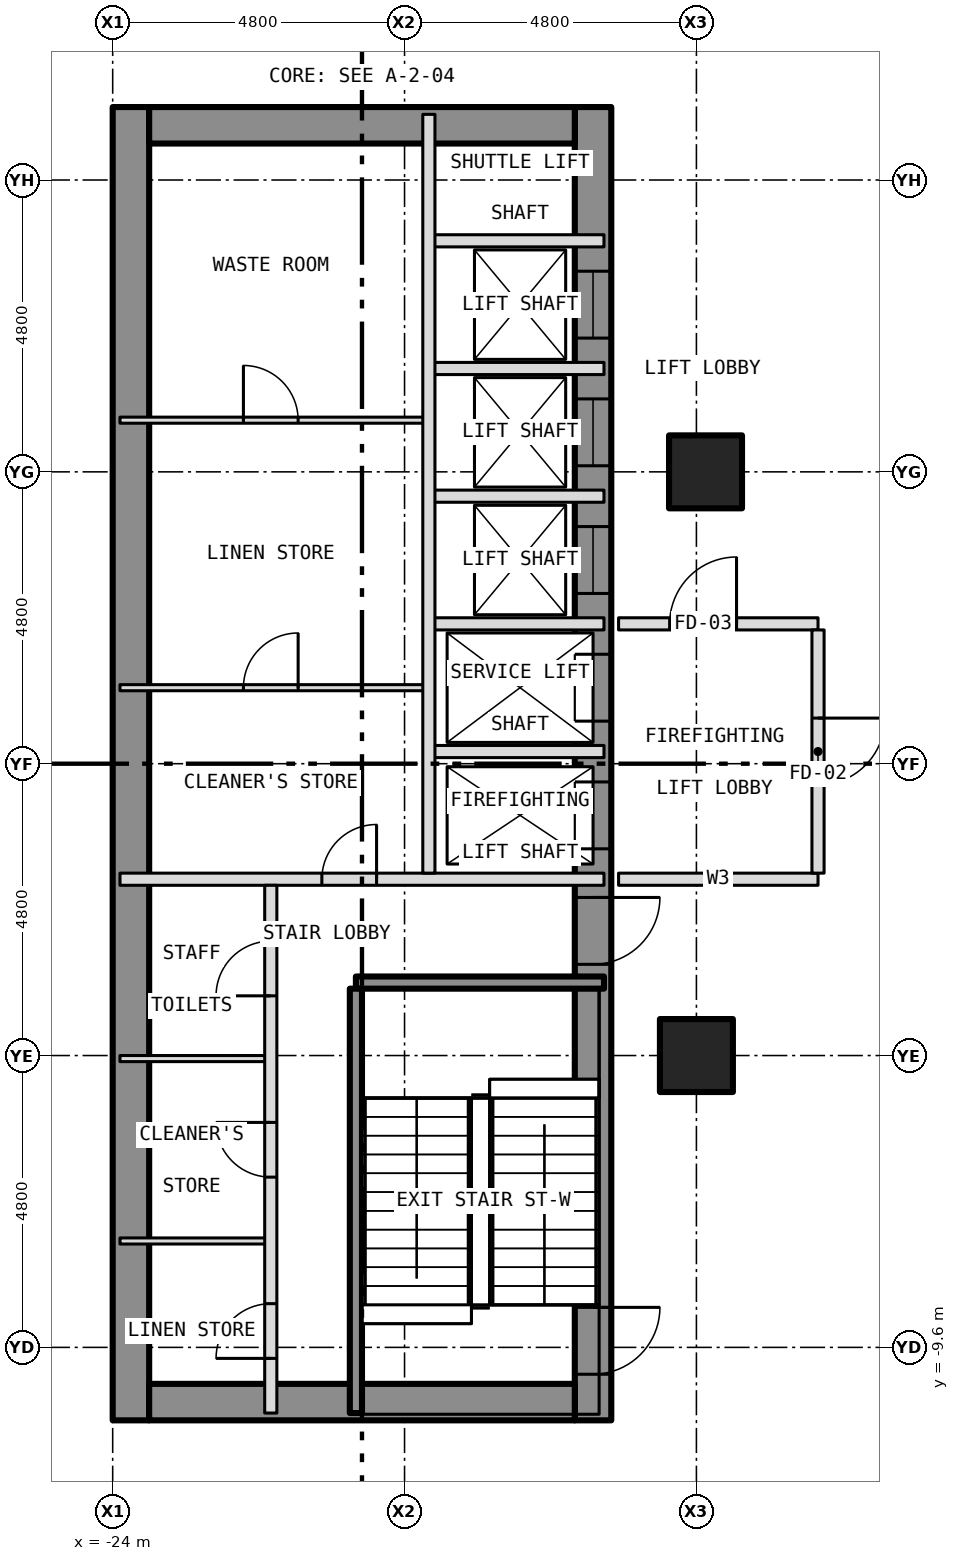
"""IFC4 building model, lengths in metres.
Left out: names, types, materials, properties, quantities, classifications, styles, units other than length and angle.
Written with IfcOpenShell. Run it as: python <this file> out.ifc"""

import sys

from ifc_helpers import new_model, si_unit, direction, frame, frame_2d, origin, origin_2d, place, context, subcontext, project, spatial, rectangle, hollow_rectangle, extrude, element, fill, save


model = new_model("IFC4")
c1 = context("Model", 3, precision=1e-05, world=origin(), true_north=direction((0.0, 1.0)))
c2 = subcontext(c1, "Body", "Model", "MODEL_VIEW")
j1 = project(units=[si_unit("LENGTHUNIT", "METRE"), si_unit("PLANEANGLEUNIT", "RADIAN")], contexts=[c1])
p1 = place(None, origin())
s1 = spatial("IfcSite", under=j1, at=p1, CompositionType="ELEMENT")
p2 = place(p1, origin())
s2 = spatial("IfcBuilding", under=s1, at=p2, CompositionType="ELEMENT")
p3 = place(p2, frame((0.0, 0.0, 7.5)))
s3 = spatial("IfcBuildingStorey", under=s2, at=p3, CompositionType="ELEMENT", Elevation=7.5)
for number, where, z_axis, x_axis in (
    (1, (-14.4, -4.8, -0.25), (0.0, 0.0, 1.0), (1.0, 0.0, 0.0)),
    (2, (-14.25, 4.8, -0.25), (0.0, 0.0, 1.0), (1.0, 0.0, 0.0)),
):
    element("IfcColumn", number, at=place(p3, frame(where, z_axis=z_axis, x_axis=x_axis)), inside=s3, PredefinedType="COLUMN", context=c2, shape_type="SweptSolid", body=[
        extrude(hollow_rectangle(XDim=1.2, YDim=1.2, WallThickness=0.07, at=origin_2d()), origin(), (0.0, 0.0, 1.0), 8.05),
    ])
p4 = place(p3, frame((-16.1, -10.8, 0.0), z_axis=(0.0, 0.0, 1.0), x_axis=(0.0, 1.0, 0.0)))
e3 = element("IfcWall", 3, at=p4, inside=s3, PredefinedType="SHEAR", context=c2, shape_type="SweptSolid", body=[
    extrude(rectangle(XDim=21.6, YDim=0.6, at=frame_2d((10.8, 0.0))), origin(), (0.0, 0.0, 1.0), 7.7),
])
p5 = place(p4, frame((9.4, 0.0, 0.0)))
e4 = element("IfcOpeningElement", 4, at=p5, cuts=e3, PredefinedType="OPENING", context=c2, shape_type="SweptSolid", body=[
    extrude(rectangle(XDim=1.1, YDim=2.1, at=frame_2d((0.55, 1.05))), frame((0.0, 0.312, 0.0), z_axis=(0.0, -1.0, 0.0), x_axis=(1.0, 0.0, 0.0)), (0.0, 0.0, 1.0), 0.624),
])
p6 = place(p4, frame((11.5, 0.0, 0.0)))
e5 = element("IfcOpeningElement", 5, at=p6, cuts=e3, PredefinedType="OPENING", context=c2, shape_type="SweptSolid", body=[
    extrude(rectangle(XDim=1.1, YDim=2.1, at=frame_2d((0.55, 1.05))), frame((0.0, 0.312, 0.0), z_axis=(0.0, -1.0, 0.0), x_axis=(1.0, 0.0, 0.0)), (0.0, 0.0, 1.0), 0.624),
])
p7 = place(p4, frame((13.6, 0.0, 0.0)))
e6 = element("IfcOpeningElement", 6, at=p7, cuts=e3, PredefinedType="OPENING", context=c2, shape_type="SweptSolid", body=[
    extrude(rectangle(XDim=1.1, YDim=2.1, at=frame_2d((0.55, 1.05))), frame((0.0, 0.312, 0.0), z_axis=(0.0, -1.0, 0.0), x_axis=(1.0, 0.0, 0.0)), (0.0, 0.0, 1.0), 0.624),
])
p8 = place(p4, frame((15.7, 0.0, 0.0)))
e7 = element("IfcOpeningElement", 7, at=p8, cuts=e3, PredefinedType="OPENING", context=c2, shape_type="SweptSolid", body=[
    extrude(rectangle(XDim=1.1, YDim=2.1, at=frame_2d((0.55, 1.05))), frame((0.0, 0.312, 0.0), z_axis=(0.0, -1.0, 0.0), x_axis=(1.0, 0.0, 0.0)), (0.0, 0.0, 1.0), 0.624),
])
p9 = place(p4, frame((17.8, 0.0, 0.0)))
e8 = element("IfcOpeningElement", 8, at=p9, cuts=e3, PredefinedType="OPENING", context=c2, shape_type="SweptSolid", body=[
    extrude(rectangle(XDim=1.1, YDim=2.1, at=frame_2d((0.55, 1.05))), frame((0.0, 0.312, 0.0), z_axis=(0.0, -1.0, 0.0), x_axis=(1.0, 0.0, 0.0)), (0.0, 0.0, 1.0), 0.624),
])
p10 = place(p4, frame((0.758, 0.0, 0.0)))
e9 = element("IfcOpeningElement", 9, at=p10, cuts=e3, PredefinedType="OPENING", context=c2, shape_type="SweptSolid", body=[
    extrude(rectangle(XDim=1.1, YDim=2.1, at=frame_2d((0.55, 1.05))), frame((0.0, 0.312, 0.0), z_axis=(0.0, -1.0, 0.0), x_axis=(1.0, 0.0, 0.0)), (0.0, 0.0, 1.0), 0.624),
])
p11 = place(p4, frame((7.5, 0.0, 0.0)))
e10 = element("IfcOpeningElement", 10, at=p11, cuts=e3, PredefinedType="OPENING", context=c2, shape_type="SweptSolid", body=[
    extrude(rectangle(XDim=1.1, YDim=2.1, at=frame_2d((0.55, 1.05))), frame((0.0, 0.312, 0.0), z_axis=(0.0, -1.0, 0.0), x_axis=(1.0, 0.0, 0.0)), (0.0, 0.0, 1.0), 0.624),
])
p12 = place(p3, frame((-23.7, -10.8, 0.0), z_axis=(0.0, 0.0, 1.0), x_axis=(0.0, 1.0, 0.0)))
e11 = element("IfcWall", 11, at=p12, inside=s3, PredefinedType="SHEAR", context=c2, shape_type="SweptSolid", body=[
    extrude(rectangle(XDim=21.6, YDim=0.6, at=frame_2d((10.8, 0.0))), origin(), (0.0, 0.0, 1.0), 7.7),
])
for number, where, z_axis, x_axis in (
    (12, (-23.4, 10.5, 0.0), (0.0, 0.0, 1.0), (1.0, 0.0, 0.0)),
    (13, (-23.4, -10.5, 0.0), (0.0, 0.0, 1.0), (1.0, 0.0, 0.0)),
):
    element("IfcWall", number, at=place(p3, frame(where, z_axis=z_axis, x_axis=x_axis)), inside=s3, PredefinedType="SHEAR", context=c2, shape_type="SweptSolid", body=[
        extrude(rectangle(XDim=7.0, YDim=0.6, at=frame_2d((3.5, 0.0))), origin(), (0.0, 0.0, 1.0), 7.7),
    ])
for number, where, z_axis, x_axis in (
    (14, (-23.88, -7.85, 0.0), (0.0, 0.0, 1.0), (1.0, 0.0, 0.0)),
    (15, (-23.88, -4.85, 0.0), (0.0, 0.0, 1.0), (1.0, 0.0, 0.0)),
):
    element("IfcWall", number, at=place(p3, frame(where, z_axis=z_axis, x_axis=x_axis)), inside=s3, PredefinedType="PARTITIONING", context=c2, shape_type="SweptSolid", body=[
        extrude(rectangle(XDim=2.48, YDim=0.1, at=frame_2d((1.24, 0.0))), origin(), (0.0, 0.0, 1.0), 7.7),
    ])
p13 = place(p3, frame((-20.0, -3.6, 0.0), z_axis=(0.0, 0.0, 1.0), x_axis=(1.0, 0.0, 0.0)))
e16 = element("IfcWall", 16, at=p13, inside=s3, PredefinedType="SHEAR", context=c2, shape_type="SweptSolid", body=[
    extrude(rectangle(XDim=4.08, YDim=0.2, at=frame_2d((2.04, 0.0))), origin(), (0.0, 0.0, 1.0), 7.7),
])
p14 = place(p3, frame((-23.88, -1.9, 0.0), z_axis=(0.0, 0.0, 1.0), x_axis=(1.0, 0.0, 0.0)))
e17 = element("IfcWall", 17, at=p14, inside=s3, PredefinedType="PARTITIONING", context=c2, shape_type="SweptSolid", body=[
    extrude(rectangle(XDim=7.96, YDim=0.2, at=frame_2d((3.98, 0.0))), origin(), (0.0, 0.0, 1.0), 7.7),
])
p15 = place(p14, frame((3.32, 0.0, 0.0)))
e18 = element("IfcOpeningElement", 18, at=p15, cuts=e17, PredefinedType="OPENING", context=c2, shape_type="SweptSolid", body=[
    extrude(rectangle(XDim=0.9, YDim=2.1, at=frame_2d((0.45, 1.05))), frame((0.0, 0.112, 0.0), z_axis=(0.0, -1.0, 0.0), x_axis=(1.0, 0.0, 0.0)), (0.0, 0.0, 1.0), 0.224),
])
p16 = place(p3, frame((-15.68, -1.9, 0.0), z_axis=(0.0, 0.0, 1.0), x_axis=(1.0, 0.0, 0.0)))
e19 = element("IfcWall", 19, at=p16, inside=s3, PredefinedType="PARTITIONING", context=c2, shape_type="SweptSolid", body=[
    extrude(rectangle(XDim=3.28, YDim=0.2, at=frame_2d((1.64, 0.0))), origin(), (0.0, 0.0, 1.0), 7.8),
])
p17 = place(p3, frame((-18.8, 0.2, 0.0), z_axis=(0.0, 0.0, 1.0), x_axis=(1.0, 0.0, 0.0)))
e20 = element("IfcWall", 20, at=p17, inside=s3, PredefinedType="PARTITIONING", context=c2, shape_type="SweptSolid", body=[
    extrude(rectangle(XDim=2.88, YDim=0.2, at=frame_2d((1.44, 0.0))), origin(), (0.0, 0.0, 1.0), 7.7),
])
p18 = place(p3, frame((-23.88, 1.25, 0.0), z_axis=(0.0, 0.0, 1.0), x_axis=(1.0, 0.0, 0.0)))
e21 = element("IfcWall", 21, at=p18, inside=s3, PredefinedType="PARTITIONING", context=c2, shape_type="SweptSolid", body=[
    extrude(rectangle(XDim=5.08, YDim=0.1, at=frame_2d((2.54, 0.0))), origin(), (0.0, 0.0, 1.0), 7.7),
])
p19 = place(p18, frame((2.03, 0.0, 0.0)))
e22 = element("IfcOpeningElement", 22, at=p19, cuts=e21, PredefinedType="OPENING", context=c2, shape_type="SweptSolid", body=[
    extrude(rectangle(XDim=0.9, YDim=2.1, at=frame_2d((0.45, 1.05))), frame((0.0, 0.062, 0.0), z_axis=(0.0, -1.0, 0.0), x_axis=(1.0, 0.0, 0.0)), (0.0, 0.0, 1.0), 0.124),
])
p20 = place(p3, frame((-18.8, 2.3, 0.0), z_axis=(0.0, 0.0, 1.0), x_axis=(1.0, 0.0, 0.0)))
e23 = element("IfcWall", 23, at=p20, inside=s3, PredefinedType="PARTITIONING", context=c2, shape_type="SweptSolid", body=[
    extrude(rectangle(XDim=2.88, YDim=0.2, at=frame_2d((1.44, 0.0))), origin(), (0.0, 0.0, 1.0), 7.7),
])
p21 = place(p3, frame((-15.68, 2.3, 0.0), z_axis=(0.0, 0.0, 1.0), x_axis=(1.0, 0.0, 0.0)))
e24 = element("IfcWall", 24, at=p21, inside=s3, PredefinedType="PARTITIONING", context=c2, shape_type="SweptSolid", body=[
    extrude(rectangle(XDim=3.28, YDim=0.2, at=frame_2d((1.64, 0.0))), origin(), (0.0, 0.0, 1.0), 7.8),
])
p22 = place(p21, frame((0.84, 0.0, 0.0)))
e25 = element("IfcOpeningElement", 25, at=p22, cuts=e24, PredefinedType="OPENING", context=c2, shape_type="SweptSolid", body=[
    extrude(rectangle(XDim=1.1, YDim=2.1, at=frame_2d((0.55, 1.05))), frame((0.0, 0.112, 0.0), z_axis=(0.0, -1.0, 0.0), x_axis=(1.0, 0.0, 0.0)), (0.0, 0.0, 1.0), 0.224),
])
p23 = place(p3, frame((-18.8, 4.4, 0.0), z_axis=(0.0, 0.0, 1.0), x_axis=(1.0, 0.0, 0.0)))
e26 = element("IfcWall", 26, at=p23, inside=s3, PredefinedType="PARTITIONING", context=c2, shape_type="SweptSolid", body=[
    extrude(rectangle(XDim=2.88, YDim=0.2, at=frame_2d((1.44, 0.0))), origin(), (0.0, 0.0, 1.0), 7.7),
])
p24 = place(p3, frame((-23.88, 5.65, 0.0), z_axis=(0.0, 0.0, 1.0), x_axis=(1.0, 0.0, 0.0)))
e27 = element("IfcWall", 27, at=p24, inside=s3, PredefinedType="PARTITIONING", context=c2, shape_type="SweptSolid", body=[
    extrude(rectangle(XDim=5.08, YDim=0.1, at=frame_2d((2.54, 0.0))), origin(), (0.0, 0.0, 1.0), 7.7),
])
p25 = place(p24, frame((2.03, 0.0, 0.0)))
e28 = element("IfcOpeningElement", 28, at=p25, cuts=e27, PredefinedType="OPENING", context=c2, shape_type="SweptSolid", body=[
    extrude(rectangle(XDim=0.9, YDim=2.1, at=frame_2d((0.45, 1.05))), frame((0.0, 0.062, 0.0), z_axis=(0.0, -1.0, 0.0), x_axis=(1.0, 0.0, 0.0)), (0.0, 0.0, 1.0), 0.124),
])
for number, where, z_axis, x_axis in (
    (29, (-18.8, 6.5, 0.0), (0.0, 0.0, 1.0), (1.0, 0.0, 0.0)),
    (30, (-18.8, 8.6, 0.0), (0.0, 0.0, 1.0), (1.0, 0.0, 0.0)),
):
    element("IfcWall", number, at=place(p3, frame(where, z_axis=z_axis, x_axis=x_axis)), inside=s3, PredefinedType="PARTITIONING", context=c2, shape_type="SweptSolid", body=[
        extrude(rectangle(XDim=2.88, YDim=0.2, at=frame_2d((1.44, 0.0))), origin(), (0.0, 0.0, 1.0), 7.7),
    ])
p26 = place(p3, frame((-21.4, -10.68, 0.0), z_axis=(0.0, 0.0, 1.0), x_axis=(0.0, 1.0, 0.0)))
e31 = element("IfcWall", 31, at=p26, inside=s3, PredefinedType="PARTITIONING", context=c2, shape_type="SweptSolid", body=[
    extrude(rectangle(XDim=8.68, YDim=0.2, at=frame_2d((4.34, 0.0))), origin(), (0.0, 0.0, 1.0), 7.7),
])
p27 = place(p26, frame((0.899, 0.0, 0.0)))
e32 = element("IfcOpeningElement", 32, at=p27, cuts=e31, PredefinedType="OPENING", context=c2, shape_type="SweptSolid", body=[
    extrude(rectangle(XDim=0.9, YDim=2.1, at=frame_2d((0.45, 1.05))), frame((0.0, 0.112, 0.0), z_axis=(0.0, -1.0, 0.0), x_axis=(1.0, 0.0, 0.0)), (0.0, 0.0, 1.0), 0.224),
])
p28 = place(p26, frame((3.88, 0.0, 0.0)))
e33 = element("IfcOpeningElement", 33, at=p28, cuts=e31, PredefinedType="OPENING", context=c2, shape_type="SweptSolid", body=[
    extrude(rectangle(XDim=0.9, YDim=2.1, at=frame_2d((0.45, 1.05))), frame((0.0, 0.112, 0.0), z_axis=(0.0, -1.0, 0.0), x_axis=(1.0, 0.0, 0.0)), (0.0, 0.0, 1.0), 0.224),
])
p29 = place(p26, frame((6.862, 0.0, 0.0)))
e34 = element("IfcOpeningElement", 34, at=p29, cuts=e31, PredefinedType="OPENING", context=c2, shape_type="SweptSolid", body=[
    extrude(rectangle(XDim=0.9, YDim=2.1, at=frame_2d((0.45, 1.05))), frame((0.0, 0.112, 0.0), z_axis=(0.0, -1.0, 0.0), x_axis=(1.0, 0.0, 0.0)), (0.0, 0.0, 1.0), 0.224),
])
p30 = place(p3, frame((-20.0, -10.68, 0.0), z_axis=(0.0, 0.0, 1.0), x_axis=(0.0, 1.0, 0.0)))
e35 = element("IfcWall", 35, at=p30, inside=s3, PredefinedType="SHEAR", context=c2, shape_type="SweptSolid", body=[
    extrude(rectangle(XDim=6.98, YDim=0.2, at=frame_2d((3.49, 0.0))), origin(), (0.0, 0.0, 1.0), 7.7),
])
p31 = place(p3, frame((-18.8, -1.8, 0.0), z_axis=(0.0, 0.0, 1.0), x_axis=(0.0, 1.0, 0.0)))
e36 = element("IfcWall", 36, at=p31, inside=s3, PredefinedType="PARTITIONING", context=c2, shape_type="SweptSolid", body=[
    extrude(rectangle(XDim=12.48, YDim=0.2, at=frame_2d((6.24, 0.0))), origin(), (0.0, 0.0, 1.0), 7.7),
])
p32 = place(p3, frame((-12.4, -1.8, 0.0), z_axis=(0.0, 0.0, 1.0), x_axis=(0.0, 1.0, 0.0)))
e37 = element("IfcWall", 37, at=p32, inside=s3, PredefinedType="PARTITIONING", context=c2, shape_type="SweptSolid", body=[
    extrude(rectangle(XDim=4.0, YDim=0.2, at=frame_2d((2.0, 0.0))), origin(), (0.0, 0.0, 1.0), 7.8),
])
p33 = place(p32, frame((1.45, 0.0, 0.0)))
e38 = element("IfcOpeningElement", 38, at=p33, cuts=e37, PredefinedType="OPENING", context=c2, shape_type="SweptSolid", body=[
    extrude(rectangle(XDim=1.1, YDim=2.1, at=frame_2d((0.55, 1.05))), frame((0.0, 0.112, 0.0), z_axis=(0.0, -1.0, 0.0), x_axis=(1.0, 0.0, 0.0)), (0.0, 0.0, 1.0), 0.224),
])
p34 = place(p5, origin())
e39 = element("IfcDoor", 39, at=p34, inside=s3, OperationType="SLIDING_TO_LEFT", PredefinedType="DOOR", context=c2, shape_type="SweptSolid", body=[
    extrude(rectangle(XDim=1.1, YDim=2.1, at=frame_2d((0.55, 1.05))), frame((0.0, 0.025, 0.0), z_axis=(0.0, -1.0, 0.0), x_axis=(1.0, 0.0, 0.0)), (0.0, 0.0, 1.0), 0.05),
])
fill(e4, e39)
p35 = place(p6, origin())
e40 = element("IfcDoor", 40, at=p35, inside=s3, OperationType="SLIDING_TO_LEFT", PredefinedType="DOOR", context=c2, shape_type="SweptSolid", body=[
    extrude(rectangle(XDim=1.1, YDim=2.1, at=frame_2d((0.55, 1.05))), frame((0.0, 0.025, 0.0), z_axis=(0.0, -1.0, 0.0), x_axis=(1.0, 0.0, 0.0)), (0.0, 0.0, 1.0), 0.05),
])
fill(e5, e40)
p36 = place(p7, origin())
e41 = element("IfcDoor", 41, at=p36, inside=s3, OperationType="SLIDING_TO_LEFT", PredefinedType="DOOR", context=c2, shape_type="SweptSolid", body=[
    extrude(rectangle(XDim=1.1, YDim=2.1, at=frame_2d((0.55, 1.05))), frame((0.0, 0.025, 0.0), z_axis=(0.0, -1.0, 0.0), x_axis=(1.0, 0.0, 0.0)), (0.0, 0.0, 1.0), 0.05),
])
fill(e6, e41)
p37 = place(p8, origin())
e42 = element("IfcDoor", 42, at=p37, inside=s3, OperationType="SLIDING_TO_LEFT", PredefinedType="DOOR", context=c2, shape_type="SweptSolid", body=[
    extrude(rectangle(XDim=1.1, YDim=2.1, at=frame_2d((0.55, 1.05))), frame((0.0, 0.025, 0.0), z_axis=(0.0, -1.0, 0.0), x_axis=(1.0, 0.0, 0.0)), (0.0, 0.0, 1.0), 0.05),
])
fill(e7, e42)
p38 = place(p9, origin())
e43 = element("IfcDoor", 43, at=p38, inside=s3, OperationType="SLIDING_TO_LEFT", PredefinedType="DOOR", context=c2, shape_type="SweptSolid", body=[
    extrude(rectangle(XDim=1.1, YDim=2.1, at=frame_2d((0.55, 1.05))), frame((0.0, 0.025, 0.0), z_axis=(0.0, -1.0, 0.0), x_axis=(1.0, 0.0, 0.0)), (0.0, 0.0, 1.0), 0.05),
])
fill(e8, e43)
p39 = place(p10, origin())
e44 = element("IfcDoor", 44, at=p39, inside=s3, OperationType="SINGLE_SWING_RIGHT", PredefinedType="DOOR", context=c2, shape_type="SweptSolid", body=[
    extrude(rectangle(XDim=1.1, YDim=2.1, at=frame_2d((0.55, 1.05))), frame((0.0, 0.025, 0.0), z_axis=(0.0, -1.0, 0.0), x_axis=(1.0, 0.0, 0.0)), (0.0, 0.0, 1.0), 0.05),
])
fill(e9, e44)
p40 = place(p11, origin())
e45 = element("IfcDoor", 45, at=p40, inside=s3, OperationType="SINGLE_SWING_RIGHT", PredefinedType="DOOR", context=c2, shape_type="SweptSolid", body=[
    extrude(rectangle(XDim=1.1, YDim=2.1, at=frame_2d((0.55, 1.05))), frame((0.0, 0.025, 0.0), z_axis=(0.0, -1.0, 0.0), x_axis=(1.0, 0.0, 0.0)), (0.0, 0.0, 1.0), 0.05),
])
fill(e10, e45)
p41 = place(p27, origin())
e46 = element("IfcDoor", 46, at=p41, inside=s3, OperationType="SINGLE_SWING_LEFT", PredefinedType="DOOR", context=c2, shape_type="SweptSolid", body=[
    extrude(rectangle(XDim=0.9, YDim=2.1, at=frame_2d((0.45, 1.05))), frame((0.0, 0.025, 0.0), z_axis=(0.0, -1.0, 0.0), x_axis=(1.0, 0.0, 0.0)), (0.0, 0.0, 1.0), 0.05),
])
fill(e32, e46)
p42 = place(p28, origin())
e47 = element("IfcDoor", 47, at=p42, inside=s3, OperationType="SINGLE_SWING_RIGHT", PredefinedType="DOOR", context=c2, shape_type="SweptSolid", body=[
    extrude(rectangle(XDim=0.9, YDim=2.1, at=frame_2d((0.45, 1.05))), frame((0.0, 0.025, 0.0), z_axis=(0.0, -1.0, 0.0), x_axis=(1.0, 0.0, 0.0)), (0.0, 0.0, 1.0), 0.05),
])
fill(e33, e47)
p43 = place(p29, origin())
e48 = element("IfcDoor", 48, at=p43, inside=s3, OperationType="SINGLE_SWING_LEFT", PredefinedType="DOOR", context=c2, shape_type="SweptSolid", body=[
    extrude(rectangle(XDim=0.9, YDim=2.1, at=frame_2d((0.45, 1.05))), frame((0.0, 0.025, 0.0), z_axis=(0.0, -1.0, 0.0), x_axis=(1.0, 0.0, 0.0)), (0.0, 0.0, 1.0), 0.05),
])
fill(e34, e48)
p44 = place(p15, origin())
e49 = element("IfcDoor", 49, at=p44, inside=s3, OperationType="SINGLE_SWING_RIGHT", PredefinedType="DOOR", context=c2, shape_type="SweptSolid", body=[
    extrude(rectangle(XDim=0.9, YDim=2.1, at=frame_2d((0.45, 1.05))), frame((0.0, 0.025, 0.0), z_axis=(0.0, -1.0, 0.0), x_axis=(1.0, 0.0, 0.0)), (0.0, 0.0, 1.0), 0.05),
])
fill(e18, e49)
p45 = place(p19, origin())
e50 = element("IfcDoor", 50, at=p45, inside=s3, OperationType="SINGLE_SWING_RIGHT", PredefinedType="DOOR", context=c2, shape_type="SweptSolid", body=[
    extrude(rectangle(XDim=0.9, YDim=2.1, at=frame_2d((0.45, 1.05))), frame((0.0, 0.025, 0.0), z_axis=(0.0, -1.0, 0.0), x_axis=(1.0, 0.0, 0.0)), (0.0, 0.0, 1.0), 0.05),
])
fill(e22, e50)
p46 = place(p25, origin())
e51 = element("IfcDoor", 51, at=p46, inside=s3, OperationType="SINGLE_SWING_LEFT", PredefinedType="DOOR", context=c2, shape_type="SweptSolid", body=[
    extrude(rectangle(XDim=0.9, YDim=2.1, at=frame_2d((0.45, 1.05))), frame((0.0, 0.025, 0.0), z_axis=(0.0, -1.0, 0.0), x_axis=(1.0, 0.0, 0.0)), (0.0, 0.0, 1.0), 0.05),
])
fill(e28, e51)
p47 = place(p33, origin())
e52 = element("IfcDoor", 52, at=p47, inside=s3, OperationType="SINGLE_SWING_RIGHT", PredefinedType="DOOR", context=c2, shape_type="SweptSolid", body=[
    extrude(rectangle(XDim=1.1, YDim=2.1, at=frame_2d((0.55, 1.05))), frame((0.0, 0.025, 0.0), z_axis=(0.0, -1.0, 0.0), x_axis=(1.0, 0.0, 0.0)), (0.0, 0.0, 1.0), 0.05),
])
fill(e38, e52)
p48 = place(p22, origin())
e53 = element("IfcDoor", 53, at=p48, inside=s3, OperationType="SINGLE_SWING_RIGHT", PredefinedType="DOOR", context=c2, shape_type="SweptSolid", body=[
    extrude(rectangle(XDim=1.1, YDim=2.1, at=frame_2d((0.55, 1.05))), frame((0.0, 0.025, 0.0), z_axis=(0.0, -1.0, 0.0), x_axis=(1.0, 0.0, 0.0)), (0.0, 0.0, 1.0), 0.05),
])
fill(e25, e53)
save(model, sys.argv[1])
